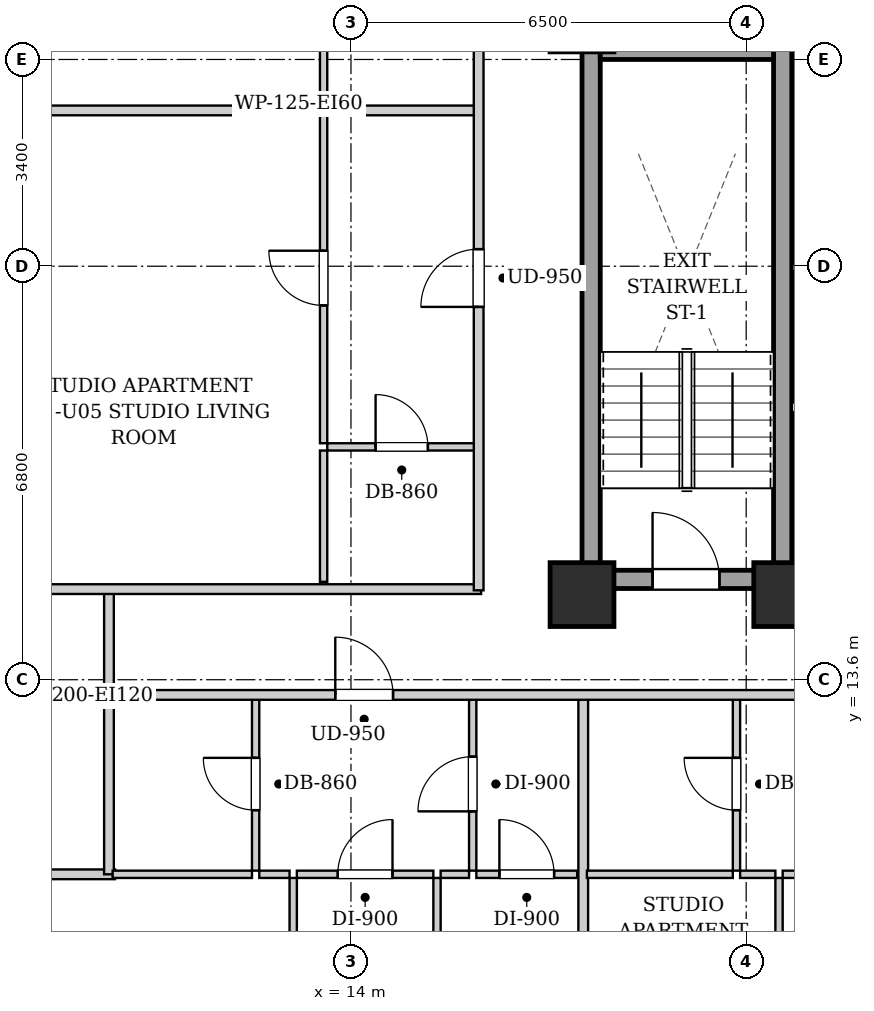
"""IFC4 building model, lengths in metres.
Left out: names, types, materials, properties, quantities, classifications, styles, units other than length and angle.
Written with IfcOpenShell. Run it as: python <this file> out.ifc"""

import sys

from ifc_helpers import new_model, si_unit, direction, frame, frame_2d, origin, origin_2d, place, context, subcontext, project, spatial, rectangle, extrude, element, fill, save


model = new_model("IFC4")
c1 = context("Model", 3, precision=1e-05, world=origin(), true_north=direction((0.0, 1.0)))
c2 = subcontext(c1, "Body", "Model", "MODEL_VIEW")
j1 = project(units=[si_unit("LENGTHUNIT", "METRE"), si_unit("PLANEANGLEUNIT", "RADIAN")], contexts=[c1])
p1 = place(None, origin())
s1 = spatial("IfcSite", under=j1, at=p1, CompositionType="ELEMENT")
p2 = place(p1, origin())
s2 = spatial("IfcBuilding", under=s1, at=p2, CompositionType="ELEMENT")
p3 = place(p2, frame((0.0, 0.0, 110.3)))
s3 = spatial("IfcBuildingStorey", under=s2, at=p3, CompositionType="ELEMENT", Elevation=110.3)
for number, where, z_axis, x_axis in (
    (1, (17.8, 15.0, 0.0), (0.0, 0.0, 1.0), (1.0, 0.0, 0.0)),
    (2, (21.15, 15.0, 0.0), (0.0, 0.0, 1.0), (1.0, 0.0, 0.0)),
):
    element("IfcColumn", number, at=place(p3, frame(where, z_axis=z_axis, x_axis=x_axis)), inside=s3, PredefinedType="COLUMN", context=c2, shape_type="SweptSolid", body=[
        extrude(rectangle(XDim=1.05, YDim=1.05, at=origin_2d()), origin(), (0.0, 0.0, 1.0), 3.2),
    ])
for number, where, z_axis, x_axis in (
    (3, (17.95, 15.1, 0.0), (0.0, 0.0, 1.0), (0.0, 1.0, 0.0)),
    (4, (21.1, 15.1, 0.0), (0.0, 0.0, 1.0), (0.0, 1.0, 0.0)),
):
    element("IfcWall", number, at=place(p3, frame(where, z_axis=z_axis, x_axis=x_axis)), inside=s3, PredefinedType="SHEAR", context=c2, shape_type="SweptSolid", body=[
        extrude(rectangle(XDim=9.0, YDim=0.3, at=frame_2d((4.5, 0.0))), origin(), (0.0, 0.0, 1.0), 2.94),
    ])
p4 = place(p3, frame((18.1, 23.95, 0.0), z_axis=(0.0, 0.0, 1.0), x_axis=(1.0, 0.0, 0.0)))
e5 = element("IfcWall", 5, at=p4, inside=s3, PredefinedType="SHEAR", context=c2, shape_type="SweptSolid", body=[
    extrude(rectangle(XDim=2.85, YDim=0.3, at=frame_2d((1.425, 0.0))), origin(), (0.0, 0.0, 1.0), 2.94),
])
p5 = place(p3, frame((18.1, 15.25, 0.0), z_axis=(0.0, 0.0, 1.0), x_axis=(1.0, 0.0, 0.0)))
e6 = element("IfcWall", 6, at=p5, inside=s3, PredefinedType="SHEAR", context=c2, shape_type="SweptSolid", body=[
    extrude(rectangle(XDim=2.85, YDim=0.3, at=frame_2d((1.425, 0.0))), origin(), (0.0, 0.0, 1.0), 2.94),
])
p6 = place(p5, frame((0.86, 0.0, 0.0)))
e7 = element("IfcOpeningElement", 7, at=p6, cuts=e6, PredefinedType="OPENING", context=c2, shape_type="SweptSolid", body=[
    extrude(rectangle(XDim=1.1, YDim=2.05, at=frame_2d((0.55, 1.025))), frame((0.0, 0.16, 0.0), z_axis=(0.0, -1.0, 0.0), x_axis=(1.0, 0.0, 0.0)), (0.0, 0.0, 1.0), 0.32),
])
p7 = place(p3, frame((21.25, 15.08, 0.0), z_axis=(0.0, 0.0, 1.0), x_axis=(1.0, 0.0, 0.0)))
e8 = element("IfcWall", 8, at=p7, inside=s3, PredefinedType="PARTITIONING", context=c2, shape_type="SweptSolid", body=[
    extrude(rectangle(XDim=8.5, YDim=0.16, at=frame_2d((4.25, 0.0))), origin(), (0.0, 0.0, 1.0), 2.313),
])
p8 = place(p7, frame((3.725, 0.0, 0.0)))
e9 = element("IfcOpeningElement", 9, at=p8, cuts=e8, PredefinedType="OPENING", context=c2, shape_type="SweptSolid", body=[
    extrude(rectangle(XDim=1.05, YDim=2.05, at=frame_2d((0.525, 1.025))), frame((0.0, 0.09, 0.0), z_axis=(0.0, -1.0, 0.0), x_axis=(1.0, 0.0, 0.0)), (0.0, 0.0, 1.0), 0.18),
])
p9 = place(p3, frame((21.25, 18.08, 0.0), z_axis=(0.0, 0.0, 1.0), x_axis=(1.0, 0.0, 0.0)))
e10 = element("IfcWall", 10, at=p9, inside=s3, PredefinedType="PARTITIONING", context=c2, shape_type="SweptSolid", body=[
    extrude(rectangle(XDim=1.1, YDim=0.16, at=frame_2d((0.55, 0.0))), origin(), (0.0, 0.0, 1.0), 2.94),
])
p10 = place(p3, frame((22.28, 20.38, 0.0), z_axis=(0.0, 0.0, 1.0), x_axis=(-1.0, 0.0, 0.0)))
e11 = element("IfcWall", 11, at=p10, inside=s3, PredefinedType="PARTITIONING", context=c2, shape_type="SweptSolid", body=[
    extrude(rectangle(XDim=1.02, YDim=0.12, at=frame_2d((0.51, 0.0))), origin(), (0.0, 0.0, 1.0), 2.94),
])
p11 = place(p3, frame((10.02, 13.35, 0.0), z_axis=(0.0, 0.0, 1.0), x_axis=(0.0, 1.0, 0.0)))
e12 = element("IfcWall", 12, at=p11, inside=s3, PredefinedType="PARTITIONING", context=c2, shape_type="SweptSolid", body=[
    extrude(rectangle(XDim=1.74, YDim=0.16, at=frame_2d((0.87, 0.0))), origin(), (0.0, 0.0, 1.0), 2.94),
])
p12 = place(p3, frame((7.78, 15.09, 0.0), z_axis=(0.0, 0.0, 1.0), x_axis=(1.0, 0.0, 0.0)))
e13 = element("IfcWall", 13, at=p12, inside=s3, PredefinedType="PARTITIONING", context=c2, shape_type="SweptSolid", body=[
    extrude(rectangle(XDim=8.36, YDim=0.16, at=frame_2d((4.18, 0.0))), origin(), (0.0, 0.0, 1.0), 2.313),
])
p13 = place(p3, frame((7.78, 10.4, 0.0), z_axis=(0.0, 0.0, 1.0), x_axis=(1.0, 0.0, 0.0)))
e14 = element("IfcWall", 14, at=p13, inside=s3, PredefinedType="PARTITIONING", context=c2, shape_type="SweptSolid", body=[
    extrude(rectangle(XDim=2.34, YDim=0.16, at=frame_2d((1.17, 0.0))), origin(), (0.0, 0.0, 1.0), 2.94),
])
p14 = place(p3, frame((10.02, 10.4, 0.0), z_axis=(0.0, 0.0, 1.0), x_axis=(0.0, 1.0, 0.0)))
e15 = element("IfcWall", 15, at=p14, inside=s3, PredefinedType="PARTITIONING", context=c2, shape_type="SweptSolid", body=[
    extrude(rectangle(XDim=2.91, YDim=0.16, at=frame_2d((1.455, 0.0))), origin(), (0.0, 0.0, 1.0), 2.94),
])
p15 = place(p3, frame((12.432, 10.46, 0.0), z_axis=(0.0, 0.0, 1.0), x_axis=(0.0, 1.0, 0.0)))
e16 = element("IfcWall", 16, at=p15, inside=s3, PredefinedType="PARTITIONING", context=c2, shape_type="SweptSolid", body=[
    extrude(rectangle(XDim=2.85, YDim=0.12, at=frame_2d((1.425, 0.0))), origin(), (0.0, 0.0, 1.0), 2.94),
])
p16 = place(p15, frame((0.995, 0.0, 0.0)))
e17 = element("IfcOpeningElement", 17, at=p16, cuts=e16, PredefinedType="OPENING", context=c2, shape_type="SweptSolid", body=[
    extrude(rectangle(XDim=0.86, YDim=2.05, at=frame_2d((0.43, 1.025))), frame((0.0, 0.07, 0.0), z_axis=(0.0, -1.0, 0.0), x_axis=(1.0, 0.0, 0.0)), (0.0, 0.0, 1.0), 0.14),
])
p17 = place(p3, frame((10.08, 10.4, 0.0), z_axis=(0.0, 0.0, 1.0), x_axis=(1.0, 0.0, 0.0)))
e18 = element("IfcWall", 18, at=p17, inside=s3, PredefinedType="PARTITIONING", context=c2, shape_type="SweptSolid", body=[
    extrude(rectangle(XDim=2.292, YDim=0.12, at=frame_2d((1.146, 0.0))), origin(), (0.0, 0.0, 1.0), 2.94),
])
p18 = place(p3, frame((16.002, 10.46, 0.0), z_axis=(0.0, 0.0, 1.0), x_axis=(0.0, 1.0, 0.0)))
e19 = element("IfcWall", 19, at=p18, inside=s3, PredefinedType="PARTITIONING", context=c2, shape_type="SweptSolid", body=[
    extrude(rectangle(XDim=2.85, YDim=0.12, at=frame_2d((1.425, 0.0))), origin(), (0.0, 0.0, 1.0), 2.94),
])
p19 = place(p18, frame((0.975, 0.0, 0.0)))
e20 = element("IfcOpeningElement", 20, at=p19, cuts=e19, PredefinedType="OPENING", context=c2, shape_type="SweptSolid", body=[
    extrude(rectangle(XDim=0.9, YDim=2.05, at=frame_2d((0.45, 1.025))), frame((0.0, 0.07, 0.0), z_axis=(0.0, -1.0, 0.0), x_axis=(1.0, 0.0, 0.0)), (0.0, 0.0, 1.0), 0.14),
])
p20 = place(p3, frame((12.492, 10.4, 0.0), z_axis=(0.0, 0.0, 1.0), x_axis=(1.0, 0.0, 0.0)))
e21 = element("IfcWall", 21, at=p20, inside=s3, PredefinedType="PARTITIONING", context=c2, shape_type="SweptSolid", body=[
    extrude(rectangle(XDim=0.498, YDim=0.12, at=frame_2d((0.249, 0.0))), origin(), (0.0, 0.0, 1.0), 2.94),
])
p21 = place(p3, frame((13.11, 10.4, 0.0), z_axis=(0.0, 0.0, 1.0), x_axis=(1.0, 0.0, 0.0)))
e22 = element("IfcWall", 22, at=p21, inside=s3, PredefinedType="PARTITIONING", context=c2, shape_type="SweptSolid", body=[
    extrude(rectangle(XDim=2.245, YDim=0.12, at=frame_2d((1.123, 0.0))), origin(), (0.0, 0.0, 1.0), 2.94),
])
p22 = place(p21, frame((0.673, 0.0, 0.0)))
e23 = element("IfcOpeningElement", 23, at=p22, cuts=e22, PredefinedType="OPENING", context=c2, shape_type="SweptSolid", body=[
    extrude(rectangle(XDim=0.9, YDim=2.05, at=frame_2d((0.45, 1.025))), frame((0.0, 0.07, 0.0), z_axis=(0.0, -1.0, 0.0), x_axis=(1.0, 0.0, 0.0)), (0.0, 0.0, 1.0), 0.14),
])
p23 = place(p3, frame((15.475, 10.4, 0.0), z_axis=(0.0, 0.0, 1.0), x_axis=(1.0, 0.0, 0.0)))
e24 = element("IfcWall", 24, at=p23, inside=s3, PredefinedType="PARTITIONING", context=c2, shape_type="SweptSolid", body=[
    extrude(rectangle(XDim=0.467, YDim=0.12, at=frame_2d((0.233, 0.0))), origin(), (0.0, 0.0, 1.0), 2.94),
])
p24 = place(p3, frame((16.062, 10.4, 0.0), z_axis=(0.0, 0.0, 1.0), x_axis=(1.0, 0.0, 0.0)))
e25 = element("IfcWall", 25, at=p24, inside=s3, PredefinedType="PARTITIONING", context=c2, shape_type="SweptSolid", body=[
    extrude(rectangle(XDim=1.658, YDim=0.12, at=frame_2d((0.829, 0.0))), origin(), (0.0, 0.0, 1.0), 2.94),
])
p25 = place(p24, frame((0.379, 0.0, 0.0)))
e26 = element("IfcOpeningElement", 26, at=p25, cuts=e25, PredefinedType="OPENING", context=c2, shape_type="SweptSolid", body=[
    extrude(rectangle(XDim=0.9, YDim=2.05, at=frame_2d((0.45, 1.025))), frame((0.0, 0.07, 0.0), z_axis=(0.0, -1.0, 0.0), x_axis=(1.0, 0.0, 0.0)), (0.0, 0.0, 1.0), 0.14),
])
p26 = place(p3, frame((13.05, 2.43, 0.0), z_axis=(0.0, 0.0, 1.0), x_axis=(0.0, 1.0, 0.0)))
e27 = element("IfcWall", 27, at=p26, inside=s3, PredefinedType="PARTITIONING", context=c2, shape_type="SweptSolid", body=[
    extrude(rectangle(XDim=7.91, YDim=0.12, at=frame_2d((3.955, 0.0))), origin(), (0.0, 0.0, 1.0), 2.94),
])
p27 = place(p26, frame((3.505, 0.0, 0.0)))
e28 = element("IfcOpeningElement", 28, at=p27, cuts=e27, PredefinedType="OPENING", context=c2, shape_type="SweptSolid", body=[
    extrude(rectangle(XDim=0.9, YDim=2.05, at=frame_2d((0.45, 1.025))), frame((0.0, 0.07, 0.0), z_axis=(0.0, -1.0, 0.0), x_axis=(1.0, 0.0, 0.0)), (0.0, 0.0, 1.0), 0.14),
])
p28 = place(p3, frame((15.415, 2.43, 0.0), z_axis=(0.0, 0.0, 1.0), x_axis=(0.0, 1.0, 0.0)))
e29 = element("IfcWall", 29, at=p28, inside=s3, PredefinedType="PARTITIONING", context=c2, shape_type="SweptSolid", body=[
    extrude(rectangle(XDim=7.91, YDim=0.12, at=frame_2d((3.955, 0.0))), origin(), (0.0, 0.0, 1.0), 2.94),
])
p29 = place(p28, frame((3.505, 0.0, 0.0)))
e30 = element("IfcOpeningElement", 30, at=p29, cuts=e29, PredefinedType="OPENING", context=c2, shape_type="SweptSolid", body=[
    extrude(rectangle(XDim=0.9, YDim=2.05, at=frame_2d((0.45, 1.025))), frame((0.0, 0.07, 0.0), z_axis=(0.0, -1.0, 0.0), x_axis=(1.0, 0.0, 0.0)), (0.0, 0.0, 1.0), 0.14),
])
p30 = place(p3, frame((17.82, 2.26, 0.0), z_axis=(0.0, 0.0, 1.0), x_axis=(0.0, 1.0, 0.0)))
e31 = element("IfcWall", 31, at=p30, inside=s3, PredefinedType="PARTITIONING", context=c2, shape_type="SweptSolid", body=[
    extrude(rectangle(XDim=11.05, YDim=0.16, at=frame_2d((5.525, 0.0))), origin(), (0.0, 0.0, 1.0), 2.313),
])
p31 = place(p3, frame((20.34, 10.46, 0.0), z_axis=(0.0, 0.0, 1.0), x_axis=(0.0, 1.0, 0.0)))
e32 = element("IfcWall", 32, at=p31, inside=s3, PredefinedType="PARTITIONING", context=c2, shape_type="SweptSolid", body=[
    extrude(rectangle(XDim=2.85, YDim=0.12, at=frame_2d((1.425, 0.0))), origin(), (0.0, 0.0, 1.0), 2.94),
])
p32 = place(p31, frame((0.995, 0.0, 0.0)))
e33 = element("IfcOpeningElement", 33, at=p32, cuts=e32, PredefinedType="OPENING", context=c2, shape_type="SweptSolid", body=[
    extrude(rectangle(XDim=0.86, YDim=2.05, at=frame_2d((0.43, 1.025))), frame((0.0, 0.07, 0.0), z_axis=(0.0, -1.0, 0.0), x_axis=(1.0, 0.0, 0.0)), (0.0, 0.0, 1.0), 0.14),
])
p33 = place(p3, frame((17.88, 10.4, 0.0), z_axis=(0.0, 0.0, 1.0), x_axis=(1.0, 0.0, 0.0)))
e34 = element("IfcWall", 34, at=p33, inside=s3, PredefinedType="PARTITIONING", context=c2, shape_type="SweptSolid", body=[
    extrude(rectangle(XDim=2.4, YDim=0.12, at=frame_2d((1.2, 0.0))), origin(), (0.0, 0.0, 1.0), 2.94),
])
p34 = place(p3, frame((20.4, 10.4, 0.0), z_axis=(0.0, 0.0, 1.0), x_axis=(1.0, 0.0, 0.0)))
e35 = element("IfcWall", 35, at=p34, inside=s3, PredefinedType="PARTITIONING", context=c2, shape_type="SweptSolid", body=[
    extrude(rectangle(XDim=0.58, YDim=0.12, at=frame_2d((0.29, 0.0))), origin(), (0.0, 0.0, 1.0), 2.94),
])
p35 = place(p3, frame((21.1, 10.4, 0.0), z_axis=(0.0, 0.0, 1.0), x_axis=(1.0, 0.0, 0.0)))
e36 = element("IfcWall", 36, at=p35, inside=s3, PredefinedType="PARTITIONING", context=c2, shape_type="SweptSolid", body=[
    extrude(rectangle(XDim=3.1, YDim=0.12, at=frame_2d((1.55, 0.0))), origin(), (0.0, 0.0, 1.0), 2.94),
])
p36 = place(p35, frame((1.1, 0.0, 0.0)))
e37 = element("IfcOpeningElement", 37, at=p36, cuts=e36, PredefinedType="OPENING", context=c2, shape_type="SweptSolid", body=[
    extrude(rectangle(XDim=0.9, YDim=2.05, at=frame_2d((0.45, 1.025))), frame((0.0, 0.07, 0.0), z_axis=(0.0, -1.0, 0.0), x_axis=(1.0, 0.0, 0.0)), (0.0, 0.0, 1.0), 0.14),
])
p37 = place(p3, frame((21.04, 0.28, 0.0), z_axis=(0.0, 0.0, 1.0), x_axis=(0.0, 1.0, 0.0)))
e38 = element("IfcWall", 38, at=p37, inside=s3, PredefinedType="PARTITIONING", context=c2, shape_type="SweptSolid", body=[
    extrude(rectangle(XDim=10.06, YDim=0.12, at=frame_2d((5.03, 0.0))), origin(), (0.0, 0.0, 1.0), 2.94),
])
p38 = place(p37, frame((4.565, 0.0, 0.0)))
e39 = element("IfcOpeningElement", 39, at=p38, cuts=e38, PredefinedType="OPENING", context=c2, shape_type="SweptSolid", body=[
    extrude(rectangle(XDim=0.9, YDim=2.05, at=frame_2d((0.45, 1.025))), frame((0.0, 0.07, 0.0), z_axis=(0.0, -1.0, 0.0), x_axis=(1.0, 0.0, 0.0)), (0.0, 0.0, 1.0), 0.14),
])
p39 = place(p3, frame((7.78, 22.962, 0.0), z_axis=(0.0, 0.0, 1.0), x_axis=(1.0, 0.0, 0.0)))
e40 = element("IfcWall", 40, at=p39, inside=s3, PredefinedType="PARTITIONING", context=c2, shape_type="SweptSolid", body=[
    extrude(rectangle(XDim=8.28, YDim=0.16, at=frame_2d((4.14, 0.0))), origin(), (0.0, 0.0, 1.0), 2.94),
])
p40 = place(p3, frame((13.61, 17.429, 0.0), z_axis=(0.0, 0.0, 1.0), x_axis=(1.0, 0.0, 0.0)))
e41 = element("IfcWall", 41, at=p40, inside=s3, PredefinedType="PARTITIONING", context=c2, shape_type="SweptSolid", body=[
    extrude(rectangle(XDim=2.45, YDim=0.12, at=frame_2d((1.225, 0.0))), origin(), (0.0, 0.0, 1.0), 2.94),
])
p41 = place(p40, frame((0.795, 0.0, 0.0)))
e42 = element("IfcOpeningElement", 42, at=p41, cuts=e41, PredefinedType="OPENING", context=c2, shape_type="SweptSolid", body=[
    extrude(rectangle(XDim=0.86, YDim=2.05, at=frame_2d((0.43, 1.025))), frame((0.0, 0.07, 0.0), z_axis=(0.0, -1.0, 0.0), x_axis=(1.0, 0.0, 0.0)), (0.0, 0.0, 1.0), 0.14),
])
p42 = place(p3, frame((13.55, 15.21, 0.0), z_axis=(0.0, 0.0, 1.0), x_axis=(0.0, 1.0, 0.0)))
e43 = element("IfcWall", 43, at=p42, inside=s3, PredefinedType="PARTITIONING", context=c2, shape_type="SweptSolid", body=[
    extrude(rectangle(XDim=2.159, YDim=0.12, at=frame_2d((1.08, 0.0))), origin(), (0.0, 0.0, 1.0), 2.94),
])
p43 = place(p3, frame((13.55, 17.489, 0.0), z_axis=(0.0, 0.0, 1.0), x_axis=(0.0, 1.0, 0.0)))
e44 = element("IfcWall", 44, at=p43, inside=s3, PredefinedType="PARTITIONING", context=c2, shape_type="SweptSolid", body=[
    extrude(rectangle(XDim=5.433, YDim=0.12, at=frame_2d((2.717, 0.0))), origin(), (0.0, 0.0, 1.0), 2.94),
])
p44 = place(p43, frame((2.266, 0.0, 0.0)))
e45 = element("IfcOpeningElement", 45, at=p44, cuts=e44, PredefinedType="OPENING", context=c2, shape_type="SweptSolid", body=[
    extrude(rectangle(XDim=0.9, YDim=2.05, at=frame_2d((0.45, 1.025))), frame((0.0, 0.07, 0.0), z_axis=(0.0, -1.0, 0.0), x_axis=(1.0, 0.0, 0.0)), (0.0, 0.0, 1.0), 0.14),
])
p45 = place(p3, frame((13.55, 23.082, 0.0), z_axis=(0.0, 0.0, 1.0), x_axis=(0.0, 1.0, 0.0)))
e46 = element("IfcWall", 46, at=p45, inside=s3, PredefinedType="PARTITIONING", context=c2, shape_type="SweptSolid", body=[
    extrude(rectangle(XDim=1.85, YDim=0.12, at=frame_2d((0.925, 0.0))), origin(), (0.0, 0.0, 1.0), 2.94),
])
p46 = place(p3, frame((10.05, 13.35, 0.0), z_axis=(0.0, 0.0, 1.0), x_axis=(1.0, 0.0, 0.0)))
e47 = element("IfcWall", 47, at=p46, inside=s3, PredefinedType="PARTITIONING", context=c2, shape_type="SweptSolid", body=[
    extrude(rectangle(XDim=30.8, YDim=0.16, at=frame_2d((15.4, 0.0))), origin(), (0.0, 0.0, 1.0), 2.94),
])
p47 = place(p46, frame((3.692, 0.0, 0.0)))
e48 = element("IfcOpeningElement", 48, at=p47, cuts=e47, PredefinedType="OPENING", context=c2, shape_type="SweptSolid", body=[
    extrude(rectangle(XDim=0.95, YDim=2.1, at=frame_2d((0.475, 1.05))), frame((0.0, 0.09, 0.0), z_axis=(0.0, -1.0, 0.0), x_axis=(1.0, 0.0, 0.0)), (0.0, 0.0, 1.0), 0.18),
])
p48 = place(p46, frame((12.095, 0.0, 0.0)))
e49 = element("IfcOpeningElement", 49, at=p48, cuts=e47, PredefinedType="OPENING", context=c2, shape_type="SweptSolid", body=[
    extrude(rectangle(XDim=0.95, YDim=2.1, at=frame_2d((0.475, 1.05))), frame((0.0, 0.09, 0.0), z_axis=(0.0, -1.0, 0.0), x_axis=(1.0, 0.0, 0.0)), (0.0, 0.0, 1.0), 0.18),
])
p49 = place(p3, frame((16.1, 15.07, 0.0), z_axis=(0.0, 0.0, 1.0), x_axis=(0.0, 1.0, 0.0)))
e50 = element("IfcWall", 50, at=p49, inside=s3, PredefinedType="PARTITIONING", context=c2, shape_type="SweptSolid", body=[
    extrude(rectangle(XDim=13.93, YDim=0.16, at=frame_2d((6.965, 0.0))), origin(), (0.0, 0.0, 1.0), 2.94),
])
p50 = place(p49, frame((4.661, 0.0, 0.0)))
e51 = element("IfcOpeningElement", 51, at=p50, cuts=e50, PredefinedType="OPENING", context=c2, shape_type="SweptSolid", body=[
    extrude(rectangle(XDim=0.95, YDim=2.1, at=frame_2d((0.475, 1.05))), frame((0.0, 0.09, 0.0), z_axis=(0.0, -1.0, 0.0), x_axis=(1.0, 0.0, 0.0)), (0.0, 0.0, 1.0), 0.18),
])
p51 = place(p49, frame((11.411, 0.0, 0.0)))
e52 = element("IfcOpeningElement", 52, at=p51, cuts=e50, PredefinedType="OPENING", context=c2, shape_type="SweptSolid", body=[
    extrude(rectangle(XDim=0.95, YDim=2.1, at=frame_2d((0.475, 1.05))), frame((0.0, 0.09, 0.0), z_axis=(0.0, -1.0, 0.0), x_axis=(1.0, 0.0, 0.0)), (0.0, 0.0, 1.0), 0.18),
])
p52 = place(p6, origin())
e53 = element("IfcDoor", 53, at=p52, inside=s3, OperationType="SINGLE_SWING_LEFT", PredefinedType="DOOR", context=c2, shape_type="SweptSolid", body=[
    extrude(rectangle(XDim=1.1, YDim=2.05, at=frame_2d((0.55, 1.025))), frame((0.0, 0.025, 0.0), z_axis=(0.0, -1.0, 0.0), x_axis=(1.0, 0.0, 0.0)), (0.0, 0.0, 1.0), 0.05),
])
fill(e7, e53)
p53 = place(p16, origin())
e54 = element("IfcDoor", 54, at=p53, inside=s3, OperationType="SINGLE_SWING_RIGHT", PredefinedType="DOOR", context=c2, shape_type="SweptSolid", body=[
    extrude(rectangle(XDim=0.86, YDim=2.05, at=frame_2d((0.43, 1.025))), frame((0.0, 0.025, 0.0), z_axis=(0.0, -1.0, 0.0), x_axis=(1.0, 0.0, 0.0)), (0.0, 0.0, 1.0), 0.05),
])
fill(e17, e54)
p54 = place(p19, origin())
e55 = element("IfcDoor", 55, at=p54, inside=s3, OperationType="SINGLE_SWING_LEFT", PredefinedType="DOOR", context=c2, shape_type="SweptSolid", body=[
    extrude(rectangle(XDim=0.9, YDim=2.05, at=frame_2d((0.45, 1.025))), frame((0.0, 0.025, 0.0), z_axis=(0.0, -1.0, 0.0), x_axis=(1.0, 0.0, 0.0)), (0.0, 0.0, 1.0), 0.05),
])
fill(e20, e55)
p55 = place(p22, origin())
e56 = element("IfcDoor", 56, at=p55, inside=s3, OperationType="SINGLE_SWING_RIGHT", PredefinedType="DOOR", context=c2, shape_type="SweptSolid", body=[
    extrude(rectangle(XDim=0.9, YDim=2.05, at=frame_2d((0.45, 1.025))), frame((0.0, 0.025, 0.0), z_axis=(0.0, -1.0, 0.0), x_axis=(1.0, 0.0, 0.0)), (0.0, 0.0, 1.0), 0.05),
])
fill(e23, e56)
p56 = place(p25, origin())
e57 = element("IfcDoor", 57, at=p56, inside=s3, OperationType="SINGLE_SWING_LEFT", PredefinedType="DOOR", context=c2, shape_type="SweptSolid", body=[
    extrude(rectangle(XDim=0.9, YDim=2.05, at=frame_2d((0.45, 1.025))), frame((0.0, 0.025, 0.0), z_axis=(0.0, -1.0, 0.0), x_axis=(1.0, 0.0, 0.0)), (0.0, 0.0, 1.0), 0.05),
])
fill(e26, e57)
p57 = place(p32, origin())
e58 = element("IfcDoor", 58, at=p57, inside=s3, OperationType="SINGLE_SWING_RIGHT", PredefinedType="DOOR", context=c2, shape_type="SweptSolid", body=[
    extrude(rectangle(XDim=0.86, YDim=2.05, at=frame_2d((0.43, 1.025))), frame((0.0, 0.025, 0.0), z_axis=(0.0, -1.0, 0.0), x_axis=(1.0, 0.0, 0.0)), (0.0, 0.0, 1.0), 0.05),
])
fill(e33, e58)
p58 = place(p41, origin())
e59 = element("IfcDoor", 59, at=p58, inside=s3, OperationType="SINGLE_SWING_LEFT", PredefinedType="DOOR", context=c2, shape_type="SweptSolid", body=[
    extrude(rectangle(XDim=0.86, YDim=2.05, at=frame_2d((0.43, 1.025))), frame((0.0, 0.025, 0.0), z_axis=(0.0, -1.0, 0.0), x_axis=(1.0, 0.0, 0.0)), (0.0, 0.0, 1.0), 0.05),
])
fill(e42, e59)
p59 = place(p44, origin())
e60 = element("IfcDoor", 60, at=p59, inside=s3, OperationType="SINGLE_SWING_RIGHT", PredefinedType="DOOR", context=c2, shape_type="SweptSolid", body=[
    extrude(rectangle(XDim=0.9, YDim=2.05, at=frame_2d((0.45, 1.025))), frame((0.0, 0.025, 0.0), z_axis=(0.0, -1.0, 0.0), x_axis=(1.0, 0.0, 0.0)), (0.0, 0.0, 1.0), 0.05),
])
fill(e45, e60)
p60 = place(p47, origin())
e61 = element("IfcDoor", 61, at=p60, inside=s3, OperationType="SINGLE_SWING_LEFT", PredefinedType="DOOR", context=c2, shape_type="SweptSolid", body=[
    extrude(rectangle(XDim=0.95, YDim=2.1, at=frame_2d((0.475, 1.05))), frame((0.0, 0.025, 0.0), z_axis=(0.0, -1.0, 0.0), x_axis=(1.0, 0.0, 0.0)), (0.0, 0.0, 1.0), 0.05),
])
fill(e48, e61)
p61 = place(p50, origin())
e62 = element("IfcDoor", 62, at=p61, inside=s3, OperationType="SINGLE_SWING_LEFT", PredefinedType="DOOR", context=c2, shape_type="SweptSolid", body=[
    extrude(rectangle(XDim=0.95, YDim=2.1, at=frame_2d((0.475, 1.05))), frame((0.0, 0.025, 0.0), z_axis=(0.0, -1.0, 0.0), x_axis=(1.0, 0.0, 0.0)), (0.0, 0.0, 1.0), 0.05),
])
fill(e51, e62)
save(model, sys.argv[1])
